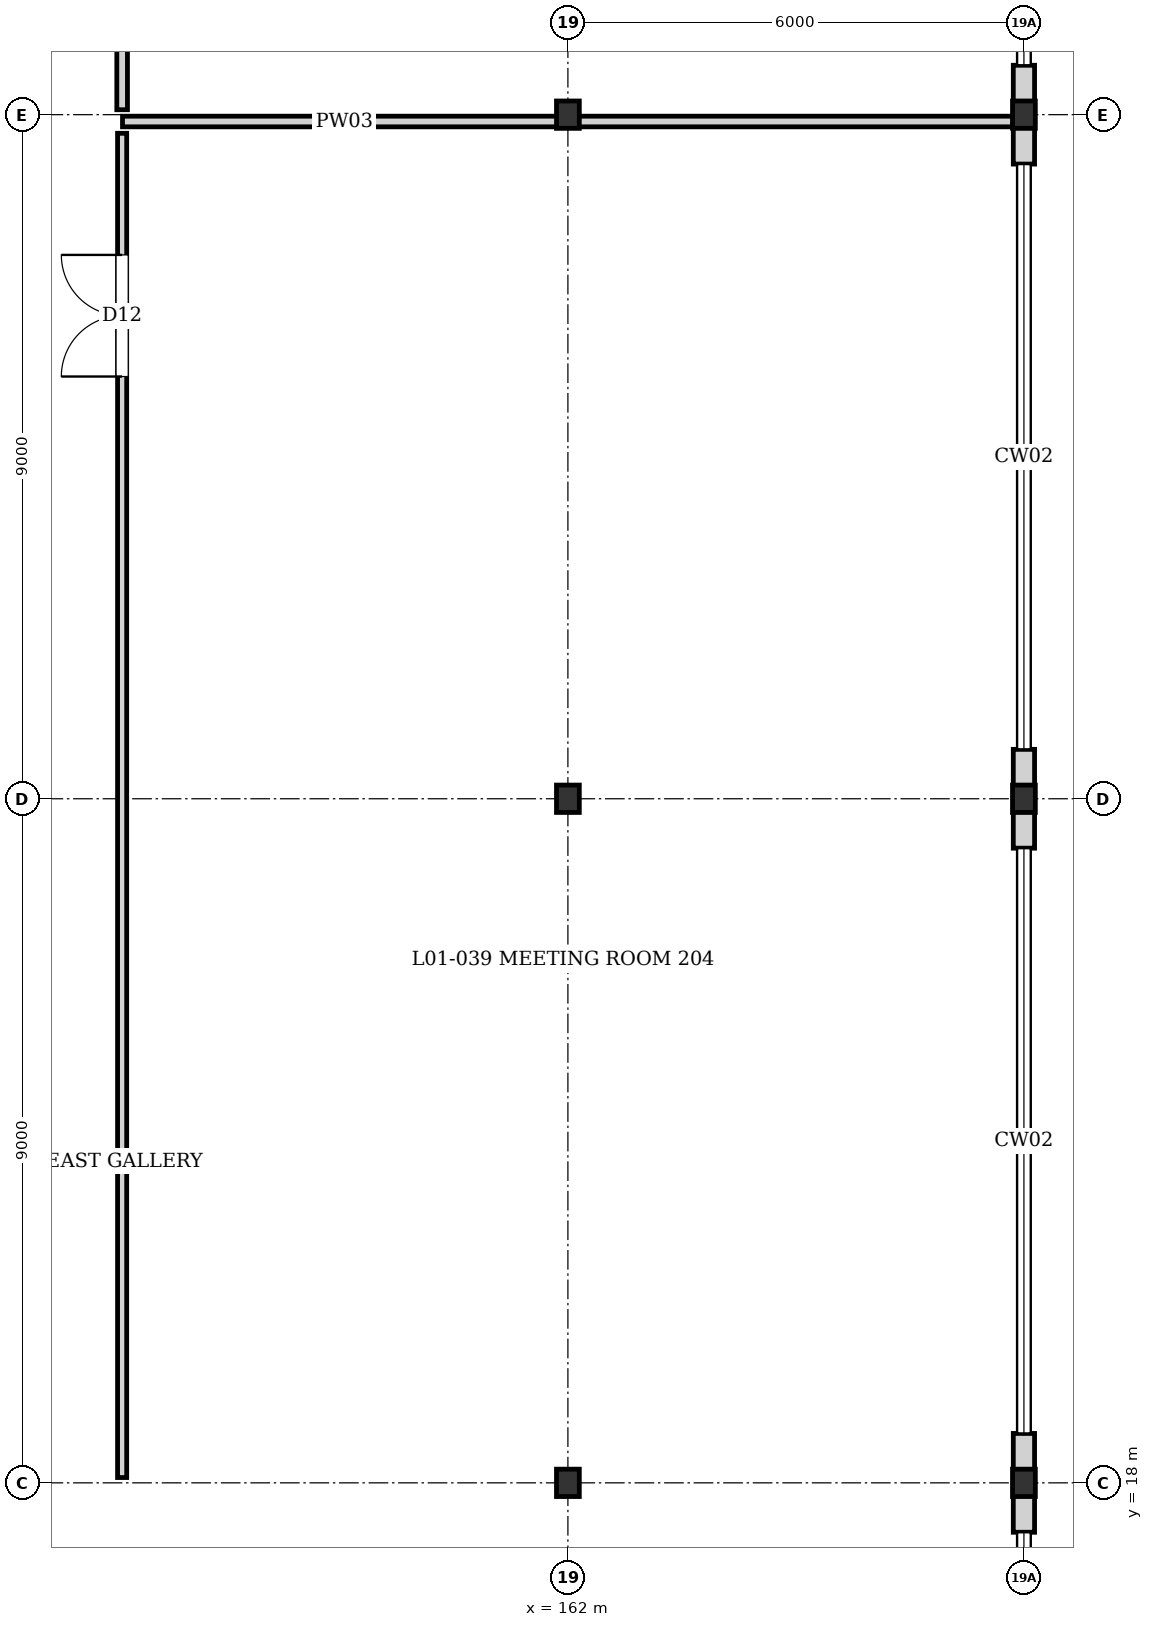
"""IFC4 building model, lengths in metres.
Left out: names, types, materials, properties, quantities, classifications, styles, units other than length and angle.
Written with IfcOpenShell. Run it as: python <this file> out.ifc"""

import sys

from ifc_helpers import new_model, si_unit, direction, frame, frame_2d, origin, origin_2d, place, context, subcontext, project, spatial, rectangle, i_section, extrude, element, fill, save


model = new_model("IFC4")
c1 = context("Model", 3, precision=1e-05, world=origin(), true_north=direction((0.0, 1.0)))
c2 = subcontext(c1, "Body", "Model", "MODEL_VIEW")
j1 = project(units=[si_unit("LENGTHUNIT", "METRE"), si_unit("PLANEANGLEUNIT", "RADIAN")], contexts=[c1])
p1 = place(None, origin())
s1 = spatial("IfcSite", under=j1, at=p1, CompositionType="ELEMENT")
p2 = place(p1, origin())
s2 = spatial("IfcBuilding", under=s1, at=p2, CompositionType="ELEMENT")
p3 = place(p2, frame((0.0, 0.0, 4.32)))
s3 = spatial("IfcBuildingStorey", under=s2, at=p3, CompositionType="ELEMENT", Elevation=4.32)
for number, where, z_axis, x_axis in (
    (1, (162.0, 18.0, 0.0), (0.0, 0.0, 1.0), (1.0, 0.0, 0.0)),
    (2, (162.0, 27.0, 0.0), (0.0, 0.0, 1.0), (1.0, 0.0, 0.0)),
    (3, (162.0, 36.0, 0.0), (0.0, 0.0, 1.0), (1.0, 0.0, 0.0)),
    (4, (168.0, 18.0, 0.0), (0.0, 0.0, 1.0), (1.0, 0.0, 0.0)),
    (5, (168.0, 27.0, 0.0), (0.0, 0.0, 1.0), (1.0, 0.0, 0.0)),
    (6, (168.0, 36.0, 0.0), (0.0, 0.0, 1.0), (1.0, 0.0, 0.0)),
):
    element("IfcColumn", number, at=place(p3, frame(where, z_axis=z_axis, x_axis=x_axis)), inside=s3, PredefinedType="COLUMN", context=c2, shape_type="SweptSolid", body=[
        extrude(i_section(OverallWidth=0.3, OverallDepth=0.36, WebThickness=0.012, FlangeThickness=0.022, at=origin_2d()), origin(), (0.0, 0.0, 1.0), 3.84),
    ])
p4 = place(p3, frame((168.0, 36.65, 0.0), z_axis=(0.0, 0.0, 1.0), x_axis=(0.0, -1.0, 0.0)))
e7 = element("IfcWall", 7, at=p4, inside=s3, PredefinedType="SOLIDWALL", context=c2, shape_type="SweptSolid", body=[
    extrude(rectangle(XDim=0.65, YDim=0.28, at=frame_2d((0.325, 0.0))), origin(), (0.0, 0.0, 1.0), 3.6),
])
for number, where, z_axis, x_axis in (
    (8, (168.0, 36.0, 0.0), (0.0, 0.0, 1.0), (0.0, -1.0, 0.0)),
    (9, (168.0, 27.65, 0.0), (0.0, 0.0, 1.0), (0.0, -1.0, 0.0)),
):
    element("IfcWall", number, at=place(p3, frame(where, z_axis=z_axis, x_axis=x_axis)), inside=s3, PredefinedType="SOLIDWALL", context=c2, shape_type="SweptSolid", body=[
        extrude(rectangle(XDim=0.65, YDim=0.28, at=frame_2d((0.325, 0.0))), origin(), (0.0, 0.0, 1.0), 3.18),
    ])
for number, where, z_axis, x_axis in (
    (10, (168.0, 27.0, 0.0), (0.0, 0.0, 1.0), (0.0, -1.0, 0.0)),
    (11, (168.0, 18.65, 0.0), (0.0, 0.0, 1.0), (0.0, -1.0, 0.0)),
):
    element("IfcWall", number, at=place(p3, frame(where, z_axis=z_axis, x_axis=x_axis)), inside=s3, PredefinedType="SOLIDWALL", context=c2, shape_type="SweptSolid", body=[
        extrude(rectangle(XDim=0.65, YDim=0.28, at=frame_2d((0.325, 0.0))), origin(), (0.0, 0.0, 1.0), 3.22),
    ])
p5 = place(p3, frame((168.0, 18.0, 0.0), z_axis=(0.0, 0.0, 1.0), x_axis=(0.0, -1.0, 0.0)))
e12 = element("IfcWall", 12, at=p5, inside=s3, PredefinedType="SOLIDWALL", context=c2, shape_type="SweptSolid", body=[
    extrude(rectangle(XDim=0.65, YDim=0.28, at=frame_2d((0.325, 0.0))), origin(), (0.0, 0.0, 1.0), 3.28),
])
p6 = place(p3, frame((156.14, 35.91, 0.0), z_axis=(0.0, 0.0, 1.0), x_axis=(1.0, 0.0, 0.0)))
e13 = element("IfcWall", 13, at=p6, inside=s3, PredefinedType="PLUMBINGWALL", context=c2, shape_type="SweptSolid", body=[
    extrude(rectangle(XDim=5.84, YDim=0.14, at=frame_2d((2.92, 0.0))), origin(), (0.0, 0.0, 1.0), 3.22),
])
p7 = place(p3, frame((156.135, 18.07, 0.0), z_axis=(0.0, 0.0, 1.0), x_axis=(0.0, 1.0, 0.0)))
e14 = element("IfcWall", 14, at=p7, inside=s3, PredefinedType="PARTITIONING", context=c2, shape_type="SweptSolid", body=[
    extrude(rectangle(XDim=17.685, YDim=0.12, at=frame_2d((8.842, 0.0))), origin(), (0.0, 0.0, 1.0), 3.6),
])
p8 = place(p7, frame((14.485, 0.0, 0.0)))
e15 = element("IfcOpeningElement", 15, at=p8, cuts=e14, PredefinedType="OPENING", context=c2, shape_type="SweptSolid", body=[
    extrude(rectangle(XDim=1.6, YDim=2.3, at=frame_2d((0.8, 1.15))), frame((0.0, 0.07, 0.0), z_axis=(0.0, -1.0, 0.0), x_axis=(1.0, 0.0, 0.0)), (0.0, 0.0, 1.0), 0.14),
])
p9 = place(p3, frame((156.135, 36.065, 0.0), z_axis=(0.0, 0.0, 1.0), x_axis=(0.0, 1.0, 0.0)))
e16 = element("IfcWall", 16, at=p9, inside=s3, PredefinedType="PLUMBINGWALL", context=c2, shape_type="SweptSolid", body=[
    extrude(rectangle(XDim=8.84, YDim=0.14, at=frame_2d((4.42, 0.0))), origin(), (0.0, 0.0, 1.0), 3.6),
])
p10 = place(p9, frame((3.97, 0.0, 0.0)))
e17 = element("IfcOpeningElement", 17, at=p10, cuts=e16, PredefinedType="OPENING", context=c2, shape_type="SweptSolid", body=[
    extrude(rectangle(XDim=0.9, YDim=2.1, at=frame_2d((0.45, 1.05))), frame((0.0, 0.08, 0.0), z_axis=(0.0, -1.0, 0.0), x_axis=(1.0, 0.0, 0.0)), (0.0, 0.0, 1.0), 0.16),
])
p11 = place(p3, frame((161.98, 35.91, 0.0), z_axis=(0.0, 0.0, 1.0), x_axis=(1.0, 0.0, 0.0)))
e18 = element("IfcWall", 18, at=p11, inside=s3, PredefinedType="PLUMBINGWALL", context=c2, shape_type="SweptSolid", body=[
    extrude(rectangle(XDim=5.875, YDim=0.14, at=frame_2d((2.938, 0.0))), origin(), (0.0, 0.0, 1.0), 3.18),
])
p12 = place(p8, origin())
e19 = element("IfcDoor", 19, at=p12, inside=s3, OperationType="DOUBLE_DOOR_SINGLE_SWING", PredefinedType="DOOR", context=c2, shape_type="SweptSolid", body=[
    extrude(rectangle(XDim=1.6, YDim=2.3, at=frame_2d((0.8, 1.15))), frame((0.0, 0.025, 0.0), z_axis=(0.0, -1.0, 0.0), x_axis=(1.0, 0.0, 0.0)), (0.0, 0.0, 1.0), 0.05),
])
fill(e15, e19)
save(model, sys.argv[1])
